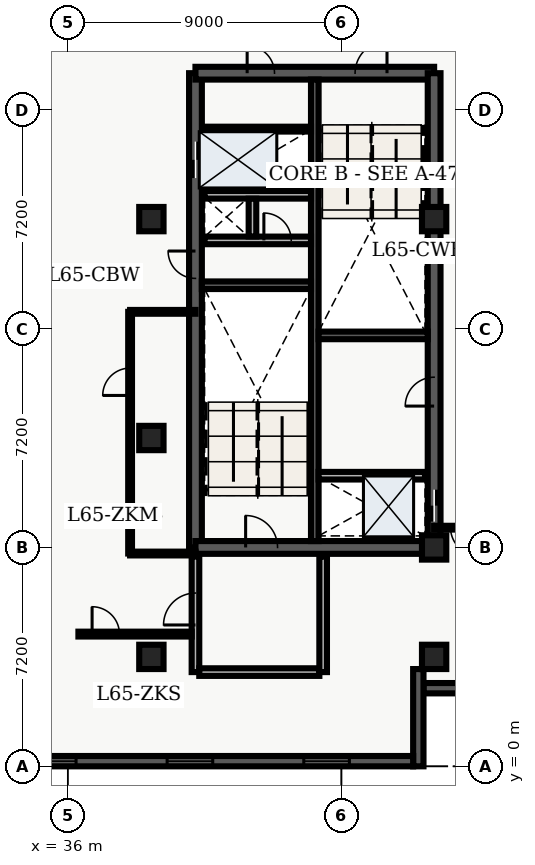
"""IFC4 building model, lengths in metres.
Left out: names, types, materials, properties, quantities, classifications, styles, units other than length and angle.
Written with IfcOpenShell. Run it as: python <this file> out.ifc"""

import sys

from ifc_helpers import new_model, entity, si_unit, converted_unit, direction, frame, origin_with_axes, origin_2d_with_axis, place, context, subcontext, project, spatial, polyline, rectangle, outline, extrude, element, fill, save


model = new_model("IFC4")
c1 = context("Model", 3, precision=1e-05, world=origin_with_axes(), true_north=direction((0.0, 1.0)))
c2 = subcontext(c1, "Body", "Model", "MODEL_VIEW")
j1 = project(units=[si_unit("LENGTHUNIT", "METRE"), converted_unit("PLANEANGLEUNIT", "DEGREE", entity("IfcPlaneAngleMeasure", 0.017), si_unit("PLANEANGLEUNIT", "RADIAN"), dimensions=[0, 0, 0, 0, 0, 0, 0])], contexts=[c1])
p1 = place(None, origin_with_axes())
s1 = spatial("IfcSite", under=j1, at=p1, CompositionType="ELEMENT")
p2 = place(p1, origin_with_axes())
s2 = spatial("IfcBuilding", under=s1, at=p2, CompositionType="ELEMENT")
p3 = place(p2, frame((0.0, 0.0, 264.6), z_axis=(0.0, 0.0, 1.0), x_axis=(1.0, 0.0, 0.0)))
s3 = spatial("IfcBuildingStorey", under=s2, at=p3, CompositionType="ELEMENT", Elevation=264.6)
p4 = place(p3, frame((40.2, 7.2, 0.0), z_axis=(0.0, 0.0, 1.0), x_axis=(0.0, 1.0, 0.0)))
e1 = element("IfcWall", 1, at=p4, inside=s3, PredefinedType="SHEAR", context=c2, shape_type="SweptSolid", body=[
    extrude(outline(polyline([(0.0, -0.21), (15.6, -0.21), (15.6, 0.21), (0.0, 0.21), (0.0, -0.21)])), origin_with_axes(), (0.0, 0.0, 1.0), 3.66),
])
p5 = place(p4, frame((12.75, 0.0, 0.0), z_axis=(0.0, 0.0, 1.0), x_axis=(1.0, 0.0, 0.0)))
e2 = element("IfcOpeningElement", 2, at=p5, cuts=e1, PredefinedType="OPENING", context=c2, shape_type="SweptSolid", body=[
    extrude(rectangle(XDim=1.2, YDim=0.44, at=origin_2d_with_axis()), origin_with_axes(), (0.0, 0.0, 1.0), 2.15),
])
p6 = place(p4, frame((9.3, 0.0, 0.0), z_axis=(0.0, 0.0, 1.0), x_axis=(1.0, 0.0, 0.0)))
e3 = element("IfcOpeningElement", 3, at=p6, cuts=e1, PredefinedType="OPENING", context=c2, shape_type="SweptSolid", body=[
    extrude(rectangle(XDim=0.9, YDim=0.44, at=origin_2d_with_axis()), origin_with_axes(), (0.0, 0.0, 1.0), 2.15),
])
p7 = place(p3, frame((40.2, 7.2, 0.0), z_axis=(0.0, 0.0, 1.0), x_axis=(1.0, 0.0, 0.0)))
e4 = element("IfcWall", 4, at=p7, inside=s3, PredefinedType="SHEAR", context=c2, shape_type="SweptSolid", body=[
    extrude(outline(polyline([(0.0, -0.21), (7.85, -0.21), (7.85, 0.21), (0.0, 0.21), (0.0, -0.21)])), origin_with_axes(), (0.0, 0.0, 1.0), 3.66),
])
p8 = place(p7, frame((2.175, 0.0, 0.0), z_axis=(0.0, 0.0, 1.0), x_axis=(1.0, 0.0, 0.0)))
e5 = element("IfcOpeningElement", 5, at=p8, cuts=e4, PredefinedType="OPENING", context=c2, shape_type="SweptSolid", body=[
    extrude(rectangle(XDim=1.05, YDim=0.44, at=origin_2d_with_axis()), origin_with_axes(), (0.0, 0.0, 1.0), 2.15),
])
p9 = place(p3, frame((40.2, 22.8, 0.0), z_axis=(0.0, 0.0, 1.0), x_axis=(1.0, 0.0, 0.0)))
e6 = element("IfcWall", 6, at=p9, inside=s3, PredefinedType="SHEAR", context=c2, shape_type="SweptSolid", body=[
    extrude(outline(polyline([(0.0, -0.21), (7.85, -0.21), (7.85, 0.21), (0.0, 0.21), (0.0, -0.21)])), origin_with_axes(), (0.0, 0.0, 1.0), 3.66),
])
p10 = place(p9, frame((5.775, 0.0, 0.0), z_axis=(0.0, 0.0, 1.0), x_axis=(1.0, 0.0, 0.0)))
e7 = element("IfcOpeningElement", 7, at=p10, cuts=e6, PredefinedType="OPENING", context=c2, shape_type="SweptSolid", body=[
    extrude(rectangle(XDim=1.05, YDim=0.44, at=origin_2d_with_axis()), origin_with_axes(), (0.0, 0.0, 1.0), 2.15),
])
p11 = place(p9, frame((2.15, 0.0, 0.0), z_axis=(0.0, 0.0, 1.0), x_axis=(1.0, 0.0, 0.0)))
e8 = element("IfcOpeningElement", 8, at=p11, cuts=e6, PredefinedType="OPENING", context=c2, shape_type="SweptSolid", body=[
    extrude(rectangle(XDim=0.9, YDim=0.44, at=origin_2d_with_axis()), origin_with_axes(), (0.0, 0.0, 1.0), 2.15),
])
p12 = place(p3, frame((48.05, 7.2, 0.0), z_axis=(0.0, 0.0, 1.0), x_axis=(0.0, 1.0, 0.0)))
e9 = element("IfcWall", 9, at=p12, inside=s3, PredefinedType="SHEAR", context=c2, shape_type="SweptSolid", body=[
    extrude(outline(polyline([(0.0, -0.21), (15.6, -0.21), (15.6, 0.21), (0.0, 0.21), (0.0, -0.21)])), origin_with_axes(), (0.0, 0.0, 1.0), 3.66),
])
p13 = place(p12, frame((1.375, 0.0, 0.0), z_axis=(0.0, 0.0, 1.0), x_axis=(1.0, 0.0, 0.0)))
e10 = element("IfcOpeningElement", 10, at=p13, cuts=e9, PredefinedType="OPENING", context=c2, shape_type="SweptSolid", body=[
    extrude(rectangle(XDim=1.05, YDim=0.44, at=origin_2d_with_axis()), origin_with_axes(), (0.0, 0.0, 1.0), 2.15),
])
p14 = place(p12, frame((5.125, 0.0, 0.0), z_axis=(0.0, 0.0, 1.0), x_axis=(1.0, 0.0, 0.0)))
e11 = element("IfcOpeningElement", 11, at=p14, cuts=e9, PredefinedType="OPENING", context=c2, shape_type="SweptSolid", body=[
    extrude(rectangle(XDim=0.95, YDim=0.44, at=origin_2d_with_axis()), origin_with_axes(), (0.0, 0.0, 1.0), 2.15),
])
p15 = place(p3, frame((44.125, 7.41, 0.0), z_axis=(0.0, 0.0, 1.0), x_axis=(0.0, 1.0, 0.0)))
e12 = element("IfcWall", 12, at=p15, inside=s3, PredefinedType="SHEAR", context=c2, shape_type="SweptSolid", body=[
    extrude(outline(polyline([(0.0, -0.125), (15.18, -0.125), (15.18, 0.125), (0.0, 0.125), (0.0, -0.125)])), origin_with_axes(), (0.0, 0.0, 1.0), 3.66),
])
for number, where, z_axis, x_axis in (
    (13, (40.41, 15.825, 0.0), (0.0, 0.0, 1.0), (1.0, 0.0, 0.0)),
    (14, (44.25, 14.175, 0.0), (0.0, 0.0, 1.0), (1.0, 0.0, 0.0)),
):
    element("IfcWall", number, at=place(p3, frame(where, z_axis=z_axis, x_axis=x_axis)), inside=s3, PredefinedType="SHEAR", context=c2, shape_type="SweptSolid", body=[
        extrude(outline(polyline([(0.0, -0.125), (3.59, -0.125), (3.59, 0.125), (0.0, 0.125), (0.0, -0.125)])), origin_with_axes(), (0.0, 0.0, 1.0), 3.66),
    ])
p16 = place(p3, frame((40.5, 17.3, 0.0), z_axis=(0.0, 0.0, 1.0), x_axis=(1.0, 0.0, 0.0)))
e15 = element("IfcWall", 15, at=p16, inside=s3, PredefinedType="SOLIDWALL", context=c2, shape_type="SweptSolid", body=[
    extrude(outline(polyline([(0.0, -0.125), (3.5, -0.125), (3.5, 0.125), (0.0, 0.125), (0.0, -0.125)])), origin_with_axes(), (0.0, 0.0, 1.0), 2.7),
])
p17 = place(p16, frame((2.4, 0.0, 0.0), z_axis=(0.0, 0.0, 1.0), x_axis=(1.0, 0.0, 0.0)))
e16 = element("IfcOpeningElement", 16, at=p17, cuts=e15, PredefinedType="OPENING", context=c2, shape_type="SweptSolid", body=[
    extrude(rectangle(XDim=0.9, YDim=0.27, at=origin_2d_with_axis()), origin_with_axes(), (0.0, 0.0, 1.0), 2.15),
])
p18 = place(p3, frame((40.5, 18.8, 0.0), z_axis=(0.0, 0.0, 1.0), x_axis=(1.0, 0.0, 0.0)))
e17 = element("IfcWall", 17, at=p18, inside=s3, PredefinedType="SOLIDWALL", context=c2, shape_type="SweptSolid", body=[
    extrude(outline(polyline([(0.0, -0.125), (3.5, -0.125), (3.5, 0.125), (0.0, 0.125), (0.0, -0.125)])), origin_with_axes(), (0.0, 0.0, 1.0), 2.7),
])
p19 = place(p3, frame((42.075, 17.43, 0.0), z_axis=(0.0, 0.0, 1.0), x_axis=(0.0, 1.0, 0.0)))
e18 = element("IfcWall", 18, at=p19, inside=s3, PredefinedType="SOLIDWALL", context=c2, shape_type="SweptSolid", body=[
    extrude(outline(polyline([(0.0, -0.125), (1.24, -0.125), (1.24, 0.125), (0.0, 0.125), (0.0, -0.125)])), origin_with_axes(), (0.0, 0.0, 1.0), 2.7),
])
p20 = place(p3, frame((40.2, 3.1, 0.0), z_axis=(0.0, 0.0, 1.0), x_axis=(0.0, 1.0, 0.0)))
e19 = element("IfcWall", 19, at=p20, inside=s3, PredefinedType="SOLIDWALL", context=c2, shape_type="SweptSolid", body=[
    extrude(outline(polyline([(0.0, -0.125), (3.8, -0.125), (3.8, 0.125), (0.0, 0.125), (0.0, -0.125)])), origin_with_axes(), (0.0, 0.0, 1.0), 2.7),
])
p21 = place(p20, frame((2.075, 0.0, 0.0), z_axis=(0.0, 0.0, 1.0), x_axis=(1.0, 0.0, 0.0)))
e20 = element("IfcOpeningElement", 20, at=p21, cuts=e19, PredefinedType="OPENING", context=c2, shape_type="SweptSolid", body=[
    extrude(rectangle(XDim=1.05, YDim=0.27, at=origin_2d_with_axis()), origin_with_axes(), (0.0, 0.0, 1.0), 2.15),
])
p22 = place(p3, frame((40.325, 3.1, 0.0), z_axis=(0.0, 0.0, 1.0), x_axis=(1.0, 0.0, 0.0)))
e21 = element("IfcWall", 21, at=p22, inside=s3, PredefinedType="SOLIDWALL", context=c2, shape_type="SweptSolid", body=[
    extrude(outline(polyline([(0.0, -0.125), (3.95, -0.125), (3.95, 0.125), (0.0, 0.125), (0.0, -0.125)])), origin_with_axes(), (0.0, 0.0, 1.0), 2.7),
])
p23 = place(p3, frame((44.4, 3.1, 0.0), z_axis=(0.0, 0.0, 1.0), x_axis=(0.0, 1.0, 0.0)))
e22 = element("IfcWall", 22, at=p23, inside=s3, PredefinedType="SOLIDWALL", context=c2, shape_type="SweptSolid", body=[
    extrude(outline(polyline([(0.0, -0.125), (3.8, -0.125), (3.8, 0.125), (0.0, 0.125), (0.0, -0.125)])), origin_with_axes(), (0.0, 0.0, 1.0), 2.7),
])
for number, where, z_axis, x_axis in (
    (23, (38.75, 3.6, 0.0), (0.0, 0.0, 1.0), (1.0, 0.0, 0.0)),
    (24, (38.75, 10.8, 0.0), (0.0, 0.0, 1.0), (1.0, 0.0, 0.0)),
    (25, (38.75, 18.0, 0.0), (0.0, 0.0, 1.0), (1.0, 0.0, 0.0)),
    (26, (48.05, 3.6, 0.0), (0.0, 0.0, 1.0), (1.0, 0.0, 0.0)),
    (27, (48.05, 7.2, 0.0), (0.0, 0.0, 1.0), (1.0, 0.0, 0.0)),
    (28, (48.05, 18.0, 0.0), (0.0, 0.0, 1.0), (1.0, 0.0, 0.0)),
):
    element("IfcColumn", number, at=place(p3, frame(where, z_axis=z_axis, x_axis=x_axis)), inside=s3, PredefinedType="COLUMN", context=c2, shape_type="SweptSolid", body=[
        extrude(rectangle(XDim=0.8, YDim=0.8, at=origin_2d_with_axis()), origin_with_axes(), (0.0, 0.0, 1.0), 3.9),
    ])
p24 = place(p3, frame((40.5, 20.96, 0.0), z_axis=(0.0, 0.0, 1.0), x_axis=(1.0, 0.0, 0.0)))
e29 = element("IfcWall", 29, at=p24, inside=s3, PredefinedType="PARTITIONING", context=c2, shape_type="SweptSolid", body=[
    extrude(outline(polyline([(0.0, -0.08), (3.5, -0.08), (3.5, 0.08), (0.0, 0.08), (0.0, -0.08)])), origin_with_axes(), (0.0, 0.0, 1.0), 2.7),
])
p25 = place(p3, frame((44.25, 9.56, 0.0), z_axis=(0.0, 0.0, 1.0), x_axis=(1.0, 0.0, 0.0)))
e30 = element("IfcWall", 30, at=p25, inside=s3, PredefinedType="SOLIDWALL", context=c2, shape_type="SweptSolid", body=[
    extrude(outline(polyline([(0.0, -0.125), (3.5, -0.125), (3.5, 0.125), (0.0, 0.125), (0.0, -0.125)])), origin_with_axes(), (0.0, 0.0, 1.0), 2.7),
])
p26 = place(p3, frame((49.765, 7.85, 0.0), z_axis=(0.0, 0.0, 1.0), x_axis=(-1.0, 0.0, 0.0)))
e31 = element("IfcWall", 31, at=p26, inside=s3, PredefinedType="PARTITIONING", context=c2, shape_type="SweptSolid", body=[
    extrude(outline(polyline([(0.0, -0.062), (1.715, -0.062), (1.715, 0.062), (0.0, 0.062), (0.0, -0.062)])), origin_with_axes(), (0.0, 0.0, 1.0), 2.7),
])
p27 = place(p26, frame((0.725, 0.0, 0.0), z_axis=(0.0, 0.0, 1.0), x_axis=(1.0, 0.0, 0.0)))
e32 = element("IfcOpeningElement", 32, at=p27, cuts=e31, PredefinedType="OPENING", context=c2, shape_type="SweptSolid", body=[
    extrude(rectangle(XDim=0.9, YDim=0.145, at=origin_2d_with_axis()), origin_with_axes(), (0.0, 0.0, 1.0), 2.15),
])
p28 = place(p3, frame((36.35, 4.35, 0.0), z_axis=(0.0, 0.0, 1.0), x_axis=(1.0, 0.0, 0.0)))
e33 = element("IfcWall", 33, at=p28, inside=s3, PredefinedType="PARTITIONING", context=c2, shape_type="SweptSolid", body=[
    extrude(outline(polyline([(0.0, -0.08), (3.725, -0.08), (3.725, 0.08), (0.0, 0.08), (0.0, -0.08)])), origin_with_axes(), (0.0, 0.0, 1.0), 2.7),
])
p29 = place(p28, frame((0.9, 0.0, 0.0), z_axis=(0.0, 0.0, 1.0), x_axis=(1.0, 0.0, 0.0)))
e34 = element("IfcOpeningElement", 34, at=p29, cuts=e33, PredefinedType="OPENING", context=c2, shape_type="SweptSolid", body=[
    extrude(rectangle(XDim=0.9, YDim=0.18, at=origin_2d_with_axis()), origin_with_axes(), (0.0, 0.0, 1.0), 2.15),
])
for number, where, z_axis, x_axis in (
    (35, (38.05, 7.0, 0.0), (0.0, 0.0, 1.0), (1.0, 0.0, 0.0)),
    (36, (38.05, 14.95, 0.0), (0.0, 0.0, 1.0), (1.0, 0.0, 0.0)),
):
    element("IfcWall", number, at=place(p3, frame(where, z_axis=z_axis, x_axis=x_axis)), inside=s3, PredefinedType="PARTITIONING", context=c2, shape_type="SweptSolid", body=[
        extrude(outline(polyline([(0.0, -0.062), (2.15, -0.062), (2.15, 0.062), (0.0, 0.062), (0.0, -0.062)])), origin_with_axes(), (0.0, 0.0, 1.0), 2.7),
    ])
p30 = place(p3, frame((38.05, 7.0, 0.0), z_axis=(0.0, 0.0, 1.0), x_axis=(0.0, 1.0, 0.0)))
e37 = element("IfcWall", 37, at=p30, inside=s3, PredefinedType="PARTITIONING", context=c2, shape_type="SweptSolid", body=[
    extrude(outline(polyline([(0.0, -0.062), (7.95, -0.062), (7.95, 0.062), (0.0, 0.062), (0.0, -0.062)])), origin_with_axes(), (0.0, 0.0, 1.0), 2.7),
])
p31 = place(p30, frame((5.65, 0.0, 0.0), z_axis=(0.0, 0.0, 1.0), x_axis=(1.0, 0.0, 0.0)))
e38 = element("IfcOpeningElement", 38, at=p31, cuts=e37, PredefinedType="OPENING", context=c2, shape_type="SweptSolid", body=[
    extrude(rectangle(XDim=0.9, YDim=0.145, at=origin_2d_with_axis()), origin_with_axes(), (0.0, 0.0, 1.0), 2.15),
])
p32 = place(p3, frame((49.76, 2.57, 0.0), z_axis=(0.0, 0.0, 1.0), x_axis=(-1.0, 0.0, 0.0)))
e39 = element("IfcWall", 39, at=p32, inside=s3, PredefinedType="SOLIDWALL", context=c2, shape_type="SweptSolid", body=[
    extrude(outline(polyline([(0.0, -0.17), (2.06, -0.17), (2.06, 0.17), (0.0, 0.17), (0.0, -0.17)])), origin_with_axes(), (0.0, 0.0, 1.0), 3.66),
])
p33 = place(p3, frame((47.53, 3.2, 0.0), z_axis=(0.0, 0.0, 1.0), x_axis=(0.0, -1.0, 0.0)))
e40 = element("IfcWall", 40, at=p33, inside=s3, PredefinedType="SOLIDWALL", context=c2, shape_type="SweptSolid", body=[
    extrude(outline(polyline([(0.0, -0.17), (3.2, -0.17), (3.2, 0.17), (0.0, 0.17), (0.0, -0.17)])), origin_with_axes(), (0.0, 0.0, 1.0), 3.66),
])
p34 = place(p3, frame((47.36, 0.17, 0.0), z_axis=(0.0, 0.0, 1.0), x_axis=(-1.0, 0.0, 0.0)))
e41 = element("IfcWall", 41, at=p34, inside=s3, PredefinedType="SOLIDWALL", context=c2, shape_type="SweptSolid", body=[
    extrude(outline(polyline([(0.0, -0.17), (37.16, -0.17), (37.16, 0.17), (0.0, 0.17), (0.0, -0.17)])), origin_with_axes(), (0.0, 0.0, 1.0), 3.66),
])
p35 = place(p34, frame((2.847, 0.0, 0.45), z_axis=(0.0, 0.0, 1.0), x_axis=(1.0, 0.0, 0.0)))
e42 = element("IfcOpeningElement", 42, at=p35, cuts=e41, PredefinedType="OPENING", context=c2, shape_type="SweptSolid", body=[
    extrude(rectangle(XDim=1.5, YDim=0.36, at=origin_2d_with_axis()), origin_with_axes(), (0.0, 0.0, 1.0), 2.1),
])
p36 = place(p34, frame((7.342, 0.0, 0.45), z_axis=(0.0, 0.0, 1.0), x_axis=(1.0, 0.0, 0.0)))
e43 = element("IfcOpeningElement", 43, at=p36, cuts=e41, PredefinedType="OPENING", context=c2, shape_type="SweptSolid", body=[
    extrude(rectangle(XDim=1.5, YDim=0.36, at=origin_2d_with_axis()), origin_with_axes(), (0.0, 0.0, 1.0), 2.1),
])
p37 = place(p34, frame((11.837, 0.0, 0.45), z_axis=(0.0, 0.0, 1.0), x_axis=(1.0, 0.0, 0.0)))
e44 = element("IfcOpeningElement", 44, at=p37, cuts=e41, PredefinedType="OPENING", context=c2, shape_type="SweptSolid", body=[
    extrude(rectangle(XDim=1.5, YDim=0.36, at=origin_2d_with_axis()), origin_with_axes(), (0.0, 0.0, 1.0), 2.1),
])
p38 = place(p34, frame((16.332, 0.0, 0.45), z_axis=(0.0, 0.0, 1.0), x_axis=(1.0, 0.0, 0.0)))
e45 = element("IfcOpeningElement", 45, at=p38, cuts=e41, PredefinedType="OPENING", context=c2, shape_type="SweptSolid", body=[
    extrude(rectangle(XDim=1.5, YDim=0.36, at=origin_2d_with_axis()), origin_with_axes(), (0.0, 0.0, 1.0), 2.1),
])
p39 = place(p34, frame((20.827, 0.0, 0.45), z_axis=(0.0, 0.0, 1.0), x_axis=(1.0, 0.0, 0.0)))
e46 = element("IfcOpeningElement", 46, at=p39, cuts=e41, PredefinedType="OPENING", context=c2, shape_type="SweptSolid", body=[
    extrude(rectangle(XDim=1.5, YDim=0.36, at=origin_2d_with_axis()), origin_with_axes(), (0.0, 0.0, 1.0), 2.1),
])
p40 = place(p34, frame((25.322, 0.0, 0.45), z_axis=(0.0, 0.0, 1.0), x_axis=(1.0, 0.0, 0.0)))
e47 = element("IfcOpeningElement", 47, at=p40, cuts=e41, PredefinedType="OPENING", context=c2, shape_type="SweptSolid", body=[
    extrude(rectangle(XDim=1.5, YDim=0.36, at=origin_2d_with_axis()), origin_with_axes(), (0.0, 0.0, 1.0), 2.1),
])
p41 = place(p34, frame((29.817, 0.0, 0.45), z_axis=(0.0, 0.0, 1.0), x_axis=(1.0, 0.0, 0.0)))
e48 = element("IfcOpeningElement", 48, at=p41, cuts=e41, PredefinedType="OPENING", context=c2, shape_type="SweptSolid", body=[
    extrude(rectangle(XDim=1.5, YDim=0.36, at=origin_2d_with_axis()), origin_with_axes(), (0.0, 0.0, 1.0), 2.1),
])
p42 = place(p34, frame((34.312, 0.0, 0.45), z_axis=(0.0, 0.0, 1.0), x_axis=(1.0, 0.0, 0.0)))
e49 = element("IfcOpeningElement", 49, at=p42, cuts=e41, PredefinedType="OPENING", context=c2, shape_type="SweptSolid", body=[
    extrude(rectangle(XDim=1.5, YDim=0.36, at=origin_2d_with_axis()), origin_with_axes(), (0.0, 0.0, 1.0), 2.1),
])
p43 = place(p12, frame((1.375, 0.0, 0.0), z_axis=(0.0, 0.0, 1.0), x_axis=(1.0, 0.0, 0.0)))
e50 = element("IfcDoor", 50, at=p43, inside=s3, OperationType="SLIDING_TO_LEFT", PredefinedType="DOOR", context=c2, shape_type="SweptSolid", body=[
    extrude(rectangle(XDim=1.05, YDim=0.09, at=origin_2d_with_axis()), origin_with_axes(), (0.0, 0.0, 1.0), 2.15),
])
fill(e10, e50)
p44 = place(p4, frame((12.75, 0.0, 0.0), z_axis=(0.0, 0.0, 1.0), x_axis=(1.0, 0.0, 0.0)))
e51 = element("IfcDoor", 51, at=p44, inside=s3, OperationType="DOUBLE_DOOR_SLIDING", PredefinedType="DOOR", context=c2, shape_type="SweptSolid", body=[
    extrude(rectangle(XDim=1.2, YDim=0.09, at=origin_2d_with_axis()), origin_with_axes(), (0.0, 0.0, 1.0), 2.15),
])
fill(e2, e51)
p45 = place(p4, frame((9.3, 0.0, 0.0), z_axis=(0.0, 0.0, 1.0), x_axis=(1.0, 0.0, 0.0)))
e52 = element("IfcDoor", 52, at=p45, inside=s3, OperationType="SINGLE_SWING_RIGHT", PredefinedType="DOOR", context=c2, shape_type="SweptSolid", body=[
    extrude(rectangle(XDim=0.9, YDim=0.09, at=origin_2d_with_axis()), origin_with_axes(), (0.0, 0.0, 1.0), 2.15),
])
fill(e3, e52)
p46 = place(p16, frame((2.4, 0.0, 0.0), z_axis=(0.0, 0.0, 1.0), x_axis=(1.0, 0.0, 0.0)))
e53 = element("IfcDoor", 53, at=p46, inside=s3, OperationType="SINGLE_SWING_LEFT", PredefinedType="DOOR", context=c2, shape_type="SweptSolid", body=[
    extrude(rectangle(XDim=0.9, YDim=0.09, at=origin_2d_with_axis()), origin_with_axes(), (0.0, 0.0, 1.0), 2.15),
])
fill(e16, e53)
p47 = place(p7, frame((2.175, 0.0, 0.0), z_axis=(0.0, 0.0, 1.0), x_axis=(1.0, 0.0, 0.0)))
e54 = element("IfcDoor", 54, at=p47, inside=s3, OperationType="SINGLE_SWING_LEFT", PredefinedType="DOOR", context=c2, shape_type="SweptSolid", body=[
    extrude(rectangle(XDim=1.05, YDim=0.09, at=origin_2d_with_axis()), origin_with_axes(), (0.0, 0.0, 1.0), 2.15),
])
fill(e5, e54)
p48 = place(p9, frame((5.775, 0.0, 0.0), z_axis=(0.0, 0.0, 1.0), x_axis=(1.0, 0.0, 0.0)))
e55 = element("IfcDoor", 55, at=p48, inside=s3, OperationType="SINGLE_SWING_RIGHT", PredefinedType="DOOR", context=c2, shape_type="SweptSolid", body=[
    extrude(rectangle(XDim=1.05, YDim=0.09, at=origin_2d_with_axis()), origin_with_axes(), (0.0, 0.0, 1.0), 2.15),
])
fill(e7, e55)
p49 = place(p20, frame((2.075, 0.0, 0.0), z_axis=(0.0, 0.0, 1.0), x_axis=(1.0, 0.0, 0.0)))
e56 = element("IfcDoor", 56, at=p49, inside=s3, OperationType="SINGLE_SWING_LEFT", PredefinedType="DOOR", context=c2, shape_type="SweptSolid", body=[
    extrude(rectangle(XDim=1.05, YDim=0.09, at=origin_2d_with_axis()), origin_with_axes(), (0.0, 0.0, 1.0), 2.15),
])
fill(e20, e56)
p50 = place(p9, frame((2.15, 0.0, 0.0), z_axis=(0.0, 0.0, 1.0), x_axis=(1.0, 0.0, 0.0)))
e57 = element("IfcDoor", 57, at=p50, inside=s3, OperationType="SINGLE_SWING_LEFT", PredefinedType="DOOR", context=c2, shape_type="SweptSolid", body=[
    extrude(rectangle(XDim=0.9, YDim=0.09, at=origin_2d_with_axis()), origin_with_axes(), (0.0, 0.0, 1.0), 2.15),
])
fill(e8, e57)
p51 = place(p12, frame((5.125, 0.0, 0.0), z_axis=(0.0, 0.0, 1.0), x_axis=(1.0, 0.0, 0.0)))
e58 = element("IfcDoor", 58, at=p51, inside=s3, OperationType="SINGLE_SWING_LEFT", PredefinedType="DOOR", context=c2, shape_type="SweptSolid", body=[
    extrude(rectangle(XDim=0.95, YDim=0.09, at=origin_2d_with_axis()), origin_with_axes(), (0.0, 0.0, 1.0), 2.15),
])
fill(e11, e58)
p52 = place(p26, frame((0.725, 0.0, 0.0), z_axis=(0.0, 0.0, 1.0), x_axis=(1.0, 0.0, 0.0)))
e59 = element("IfcDoor", 59, at=p52, inside=s3, OperationType="SINGLE_SWING_LEFT", PredefinedType="DOOR", context=c2, shape_type="SweptSolid", body=[
    extrude(rectangle(XDim=0.9, YDim=0.075, at=origin_2d_with_axis()), origin_with_axes(), (0.0, 0.0, 1.0), 2.15),
])
fill(e32, e59)
p53 = place(p28, frame((0.9, 0.0, 0.0), z_axis=(0.0, 0.0, 1.0), x_axis=(1.0, 0.0, 0.0)))
e60 = element("IfcDoor", 60, at=p53, inside=s3, OperationType="SINGLE_SWING_LEFT", PredefinedType="DOOR", context=c2, shape_type="SweptSolid", body=[
    extrude(rectangle(XDim=0.9, YDim=0.09, at=origin_2d_with_axis()), origin_with_axes(), (0.0, 0.0, 1.0), 2.15),
])
fill(e34, e60)
p54 = place(p30, frame((5.65, 0.0, 0.0), z_axis=(0.0, 0.0, 1.0), x_axis=(1.0, 0.0, 0.0)))
e61 = element("IfcDoor", 61, at=p54, inside=s3, OperationType="SINGLE_SWING_LEFT", PredefinedType="DOOR", context=c2, shape_type="SweptSolid", body=[
    extrude(rectangle(XDim=0.9, YDim=0.075, at=origin_2d_with_axis()), origin_with_axes(), (0.0, 0.0, 1.0), 2.15),
])
fill(e38, e61)
p55 = place(p34, frame((2.847, 0.0, 0.45), z_axis=(0.0, 0.0, 1.0), x_axis=(1.0, 0.0, 0.0)))
e62 = element("IfcWindow", 62, at=p55, inside=s3, PredefinedType="WINDOW", context=c2, shape_type="SweptSolid", body=[
    extrude(rectangle(XDim=1.5, YDim=0.09, at=origin_2d_with_axis()), origin_with_axes(), (0.0, 0.0, 1.0), 2.1),
])
fill(e42, e62)
p56 = place(p34, frame((7.342, 0.0, 0.45), z_axis=(0.0, 0.0, 1.0), x_axis=(1.0, 0.0, 0.0)))
e63 = element("IfcWindow", 63, at=p56, inside=s3, PredefinedType="WINDOW", context=c2, shape_type="SweptSolid", body=[
    extrude(rectangle(XDim=1.5, YDim=0.09, at=origin_2d_with_axis()), origin_with_axes(), (0.0, 0.0, 1.0), 2.1),
])
fill(e43, e63)
p57 = place(p34, frame((11.837, 0.0, 0.45), z_axis=(0.0, 0.0, 1.0), x_axis=(1.0, 0.0, 0.0)))
e64 = element("IfcWindow", 64, at=p57, inside=s3, PredefinedType="WINDOW", context=c2, shape_type="SweptSolid", body=[
    extrude(rectangle(XDim=1.5, YDim=0.09, at=origin_2d_with_axis()), origin_with_axes(), (0.0, 0.0, 1.0), 2.1),
])
fill(e44, e64)
save(model, sys.argv[1])
